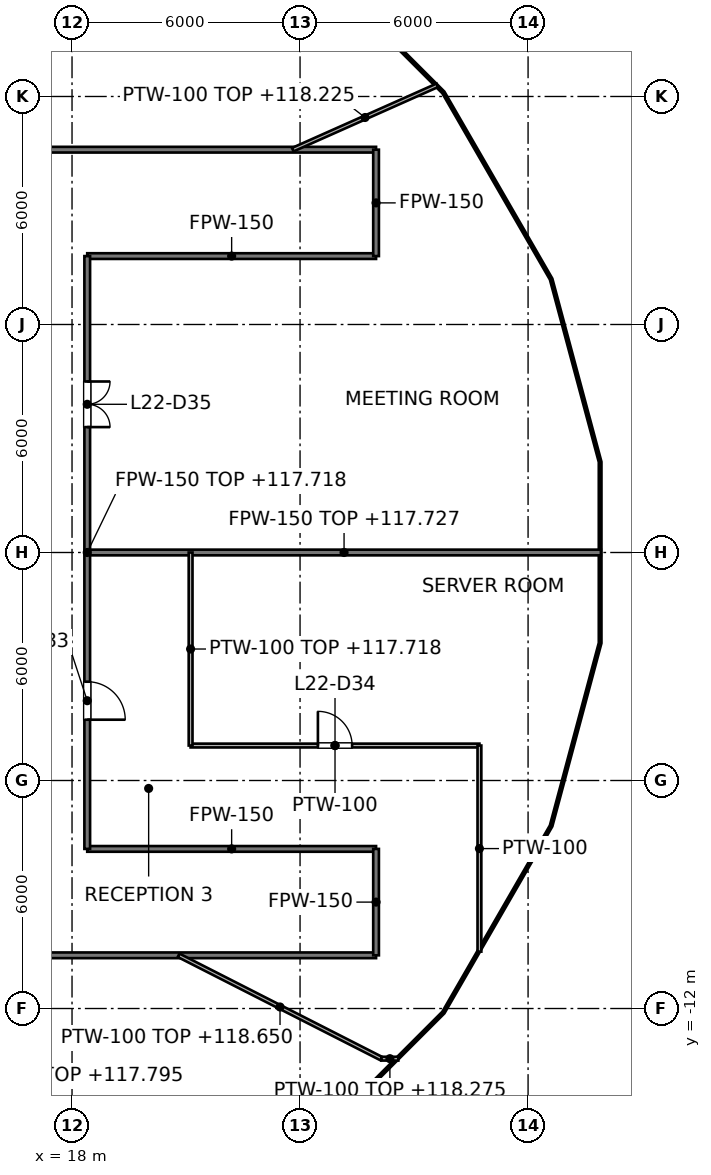
"""IFC4 building model, lengths in metres.
Left out: names, types, materials, properties, quantities, classifications, styles, units other than length and angle.
Written with IfcOpenShell. Run it as: python <this file> out.ifc"""

import sys

from ifc_helpers import new_model, si_unit, direction, frame, frame_2d, origin, place, context, subcontext, project, spatial, rectangle, extrude, element, fill, save


model = new_model("IFC4")
c1 = context("Model", 3, precision=1e-05, world=origin(), true_north=direction((0.0, 1.0)))
c2 = subcontext(c1, "Body", "Model", "MODEL_VIEW")
j1 = project(units=[si_unit("LENGTHUNIT", "METRE"), si_unit("PLANEANGLEUNIT", "RADIAN")], contexts=[c1])
p1 = place(None, origin())
s1 = spatial("IfcSite", under=j1, at=p1, CompositionType="ELEMENT")
p2 = place(p1, origin())
s2 = spatial("IfcBuilding", under=s1, at=p2, CompositionType="ELEMENT")
p3 = place(p2, frame((0.0, 0.0, 114.6)))
s3 = spatial("IfcBuildingStorey", under=s2, at=p3, CompositionType="ELEMENT", Elevation=114.6)
p4 = place(p3, frame((10.6, -10.6, 0.0), z_axis=(0.0, 0.0, 1.0), x_axis=(0.707106781187, -0.707106781187, 0.0)))
e1 = element("IfcWall", 1, at=p4, inside=s3, PredefinedType="PARTITIONING", context=c2, shape_type="SweptSolid", body=[
    extrude(rectangle(XDim=12.105, YDim=0.15, at=frame_2d((6.053, 0.0))), origin(), (0.0, 0.0, 1.0), 3.195),
])
p5 = place(p3, frame((-26.0, -10.6, 0.0), z_axis=(0.0, 0.0, 1.0), x_axis=(1.0, 0.0, 0.0)))
e2 = element("IfcWall", 2, at=p5, inside=s3, PredefinedType="PARTITIONING", context=c2, shape_type="SweptSolid", body=[
    extrude(rectangle(XDim=52.0, YDim=0.15, at=frame_2d((26.0, 0.0))), origin(), (0.0, 0.0, 1.0), 3.127),
])
p6 = place(p5, frame((9.034, 0.0, 0.0)))
e3 = element("IfcOpeningElement", 3, at=p6, cuts=e2, PredefinedType="OPENING", context=c2, shape_type="SweptSolid", body=[
    extrude(rectangle(XDim=1.2, YDim=2.1, at=frame_2d((0.6, 1.05))), frame((0.0, 0.075, 0.0), z_axis=(0.0, -1.0, 0.0), x_axis=(1.0, 0.0, 0.0)), (0.0, 0.0, 1.0), 0.15),
])
p7 = place(p5, frame((19.767, 0.0, 0.0)))
e4 = element("IfcOpeningElement", 4, at=p7, cuts=e2, PredefinedType="OPENING", context=c2, shape_type="SweptSolid", body=[
    extrude(rectangle(XDim=1.0, YDim=2.1, at=frame_2d((0.5, 1.05))), frame((0.0, 0.075, 0.0), z_axis=(0.0, -1.0, 0.0), x_axis=(1.0, 0.0, 0.0)), (0.0, 0.0, 1.0), 0.15),
])
p8 = place(p5, frame((21.763, 0.0, 0.0)))
e5 = element("IfcOpeningElement", 5, at=p8, cuts=e2, PredefinedType="OPENING", context=c2, shape_type="SweptSolid", body=[
    extrude(rectangle(XDim=1.0, YDim=2.1, at=frame_2d((0.5, 1.05))), frame((0.0, 0.075, 0.0), z_axis=(0.0, -1.0, 0.0), x_axis=(1.0, 0.0, 0.0)), (0.0, 0.0, 1.0), 0.15),
])
p9 = place(p5, frame((29.38, 0.0, 0.0)))
e6 = element("IfcOpeningElement", 6, at=p9, cuts=e2, PredefinedType="OPENING", context=c2, shape_type="SweptSolid", body=[
    extrude(rectangle(XDim=1.0, YDim=2.1, at=frame_2d((0.5, 1.05))), frame((0.0, 0.075, 0.0), z_axis=(0.0, -1.0, 0.0), x_axis=(1.0, 0.0, 0.0)), (0.0, 0.0, 1.0), 0.15),
])
p10 = place(p5, frame((41.202, 0.0, 0.0)))
e7 = element("IfcOpeningElement", 7, at=p10, cuts=e2, PredefinedType="OPENING", context=c2, shape_type="SweptSolid", body=[
    extrude(rectangle(XDim=1.0, YDim=2.1, at=frame_2d((0.5, 1.05))), frame((0.0, 0.075, 0.0), z_axis=(0.0, -1.0, 0.0), x_axis=(1.0, 0.0, 0.0)), (0.0, 0.0, 1.0), 0.15),
])
p11 = place(p3, frame((18.4, -7.8, 0.0), z_axis=(0.0, 0.0, 1.0), x_axis=(1.0, 0.0, 0.0)))
e8 = element("IfcWall", 8, at=p11, inside=s3, PredefinedType="PARTITIONING", context=c2, shape_type="SweptSolid", body=[
    extrude(rectangle(XDim=7.6, YDim=0.15, at=frame_2d((3.8, 0.0))), origin(), (0.0, 0.0, 1.0), 3.276),
])
p12 = place(p3, frame((18.4, 0.0, 0.0), z_axis=(0.0, 0.0, 1.0), x_axis=(1.0, 0.0, 0.0)))
e9 = element("IfcWall", 9, at=p12, inside=s3, PredefinedType="PARTITIONING", context=c2, shape_type="SweptSolid", body=[
    extrude(rectangle(XDim=13.516, YDim=0.15, at=frame_2d((6.758, 0.0))), origin(), (0.0, 0.0, 1.0), 3.127),
])
p13 = place(p3, frame((18.4, 7.8, 0.0), z_axis=(0.0, 0.0, 1.0), x_axis=(1.0, 0.0, 0.0)))
e10 = element("IfcWall", 10, at=p13, inside=s3, PredefinedType="PARTITIONING", context=c2, shape_type="SweptSolid", body=[
    extrude(rectangle(XDim=7.6, YDim=0.15, at=frame_2d((3.8, 0.0))), origin(), (0.0, 0.0, 1.0), 3.276),
])
p14 = place(p3, frame((-26.0, 10.6, 0.0), z_axis=(0.0, 0.0, 1.0), x_axis=(1.0, 0.0, 0.0)))
e11 = element("IfcWall", 11, at=p14, inside=s3, PredefinedType="PARTITIONING", context=c2, shape_type="SweptSolid", body=[
    extrude(rectangle(XDim=52.0, YDim=0.15, at=frame_2d((26.0, 0.0))), origin(), (0.0, 0.0, 1.0), 3.077),
])
p15 = place(p14, frame((18.729, 0.0, 0.0)))
e12 = element("IfcOpeningElement", 12, at=p15, cuts=e11, PredefinedType="OPENING", context=c2, shape_type="SweptSolid", body=[
    extrude(rectangle(XDim=1.0, YDim=2.1, at=frame_2d((0.5, 1.05))), frame((0.0, 0.075, 0.0), z_axis=(0.0, -1.0, 0.0), x_axis=(1.0, 0.0, 0.0)), (0.0, 0.0, 1.0), 0.15),
])
p16 = place(p14, frame((7.05, 0.0, 0.0)))
e13 = element("IfcOpeningElement", 13, at=p16, cuts=e11, PredefinedType="OPENING", context=c2, shape_type="SweptSolid", body=[
    extrude(rectangle(XDim=1.2, YDim=2.1, at=frame_2d((0.6, 1.05))), frame((0.0, 0.075, 0.0), z_axis=(0.0, -1.0, 0.0), x_axis=(1.0, 0.0, 0.0)), (0.0, 0.0, 1.0), 0.15),
])
p17 = place(p14, frame((40.464, 0.0, 0.0)))
e14 = element("IfcOpeningElement", 14, at=p17, cuts=e11, PredefinedType="OPENING", context=c2, shape_type="SweptSolid", body=[
    extrude(rectangle(XDim=1.0, YDim=2.1, at=frame_2d((0.5, 1.05))), frame((0.0, 0.075, 0.0), z_axis=(0.0, -1.0, 0.0), x_axis=(1.0, 0.0, 0.0)), (0.0, 0.0, 1.0), 0.15),
])
p18 = place(p14, frame((27.09, 0.0, 0.0)))
e15 = element("IfcOpeningElement", 15, at=p18, cuts=e11, PredefinedType="OPENING", context=c2, shape_type="SweptSolid", body=[
    extrude(rectangle(XDim=1.0, YDim=2.1, at=frame_2d((0.5, 1.05))), frame((0.0, 0.075, 0.0), z_axis=(0.0, -1.0, 0.0), x_axis=(1.0, 0.0, 0.0)), (0.0, 0.0, 1.0), 0.15),
])
for number, where, z_axis, x_axis in (
    (16, (26.0, -10.6, 0.0), (0.0, 0.0, 1.0), (0.0, 1.0, 0.0)),
    (17, (26.0, 7.8, 0.0), (0.0, 0.0, 1.0), (0.0, 1.0, 0.0)),
):
    element("IfcWall", number, at=place(p3, frame(where, z_axis=z_axis, x_axis=x_axis)), inside=s3, PredefinedType="PARTITIONING", context=c2, shape_type="SweptSolid", body=[
        extrude(rectangle(XDim=2.8, YDim=0.15, at=frame_2d((1.4, 0.0))), origin(), (0.0, 0.0, 1.0), 3.276),
    ])
p19 = place(p3, frame((18.4, -7.8, 0.0), z_axis=(0.0, 0.0, 1.0), x_axis=(0.0, 1.0, 0.0)))
e18 = element("IfcWall", 18, at=p19, inside=s3, PredefinedType="PARTITIONING", context=c2, shape_type="SweptSolid", body=[
    extrude(rectangle(XDim=15.6, YDim=0.15, at=frame_2d((7.8, 0.0))), origin(), (0.0, 0.0, 1.0), 3.118),
])
p20 = place(p19, frame((3.4, 0.0, 0.0)))
e19 = element("IfcOpeningElement", 19, at=p20, cuts=e18, PredefinedType="OPENING", context=c2, shape_type="SweptSolid", body=[
    extrude(rectangle(XDim=1.0, YDim=2.1, at=frame_2d((0.5, 1.05))), frame((0.0, 0.075, 0.0), z_axis=(0.0, -1.0, 0.0), x_axis=(1.0, 0.0, 0.0)), (0.0, 0.0, 1.0), 0.15),
])
p21 = place(p19, frame((11.1, 0.0, 0.0)))
e20 = element("IfcOpeningElement", 20, at=p21, cuts=e18, PredefinedType="OPENING", context=c2, shape_type="SweptSolid", body=[
    extrude(rectangle(XDim=1.2, YDim=2.1, at=frame_2d((0.6, 1.05))), frame((0.0, 0.075, 0.0), z_axis=(0.0, -1.0, 0.0), x_axis=(1.0, 0.0, 0.0)), (0.0, 0.0, 1.0), 0.15),
])
p22 = place(p3, frame((20.804, -10.6, 0.0), z_axis=(0.0, 0.0, 1.0), x_axis=(0.891002798049, -0.453997812626, 0.0)))
e21 = element("IfcWall", 21, at=p22, inside=s3, PredefinedType="PARTITIONING", context=c2, shape_type="SweptSolid", body=[
    extrude(rectangle(XDim=5.991, YDim=0.1, at=frame_2d((2.996, 0.0))), origin(), (0.0, 0.0, 1.0), 4.05),
])
p23 = place(p3, frame((26.142, -13.32, 0.0), z_axis=(0.0, 0.0, 1.0), x_axis=(1.0, 0.0, 0.0)))
e22 = element("IfcWall", 22, at=p23, inside=s3, PredefinedType="PARTITIONING", context=c2, shape_type="SweptSolid", body=[
    extrude(rectangle(XDim=0.444, YDim=0.1, at=frame_2d((0.222, 0.0))), origin(), (0.0, 0.0, 1.0), 3.675),
])
p24 = place(p3, frame((21.12, -5.08, 0.0), z_axis=(0.0, 0.0, 1.0), x_axis=(1.0, 0.0, 0.0)))
e23 = element("IfcWall", 23, at=p24, inside=s3, PredefinedType="PARTITIONING", context=c2, shape_type="SweptSolid", body=[
    extrude(rectangle(XDim=7.6, YDim=0.1, at=frame_2d((3.8, 0.0))), origin(), (0.0, 0.0, 1.0), 3.127),
])
p25 = place(p24, frame((3.35, 0.0, 0.0)))
e24 = element("IfcOpeningElement", 24, at=p25, cuts=e23, PredefinedType="OPENING", context=c2, shape_type="SweptSolid", body=[
    extrude(rectangle(XDim=0.9, YDim=2.1, at=frame_2d((0.45, 1.05))), frame((0.0, 0.05, 0.0), z_axis=(0.0, -1.0, 0.0), x_axis=(1.0, 0.0, 0.0)), (0.0, 0.0, 1.0), 0.1),
])
p26 = place(p3, frame((23.808, 10.6, 0.0), z_axis=(0.0, 0.0, 1.0), x_axis=(0.913526027042, 0.406780282114, 0.0)))
e25 = element("IfcWall", 25, at=p26, inside=s3, PredefinedType="PARTITIONING", context=c2, shape_type="SweptSolid", body=[
    extrude(rectangle(XDim=4.164, YDim=0.1, at=frame_2d((2.082, 0.0))), origin(), (0.0, 0.0, 1.0), 3.625),
])
p27 = place(p3, frame((28.72, -10.503, 0.0), z_axis=(0.0, 0.0, 1.0), x_axis=(0.0, 1.0, 0.0)))
e26 = element("IfcWall", 26, at=p27, inside=s3, PredefinedType="PARTITIONING", context=c2, shape_type="SweptSolid", body=[
    extrude(rectangle(XDim=5.423, YDim=0.1, at=frame_2d((2.711, 0.0))), origin(), (0.0, 0.0, 1.0), 3.127),
])
p28 = place(p3, frame((21.12, -5.08, 0.0), z_axis=(0.0, 0.0, 1.0), x_axis=(0.0, 1.0, 0.0)))
e27 = element("IfcWall", 27, at=p28, inside=s3, PredefinedType="PARTITIONING", context=c2, shape_type="SweptSolid", body=[
    extrude(rectangle(XDim=5.08, YDim=0.1, at=frame_2d((2.54, 0.0))), origin(), (0.0, 0.0, 1.0), 3.118),
])
p29 = place(p20, origin())
e28 = element("IfcDoor", 28, at=p29, inside=s3, OperationType="SINGLE_SWING_LEFT", PredefinedType="DOOR", context=c2, shape_type="SweptSolid", body=[
    extrude(rectangle(XDim=1.0, YDim=2.1, at=frame_2d((0.5, 1.05))), frame((0.0, 0.025, 0.0), z_axis=(0.0, -1.0, 0.0), x_axis=(1.0, 0.0, 0.0)), (0.0, 0.0, 1.0), 0.05),
])
fill(e19, e28)
p30 = place(p25, origin())
e29 = element("IfcDoor", 29, at=p30, inside=s3, OperationType="SINGLE_SWING_LEFT", PredefinedType="DOOR", context=c2, shape_type="SweptSolid", body=[
    extrude(rectangle(XDim=0.9, YDim=2.1, at=frame_2d((0.45, 1.05))), frame((0.0, 0.025, 0.0), z_axis=(0.0, -1.0, 0.0), x_axis=(1.0, 0.0, 0.0)), (0.0, 0.0, 1.0), 0.05),
])
fill(e24, e29)
p31 = place(p21, origin())
e30 = element("IfcDoor", 30, at=p31, inside=s3, OperationType="DOUBLE_DOOR_SINGLE_SWING", PredefinedType="DOOR", context=c2, shape_type="SweptSolid", body=[
    extrude(rectangle(XDim=1.2, YDim=2.1, at=frame_2d((0.6, 1.05))), frame((0.0, 0.025, 0.0), z_axis=(0.0, -1.0, 0.0), x_axis=(1.0, 0.0, 0.0)), (0.0, 0.0, 1.0), 0.05),
])
fill(e20, e30)
save(model, sys.argv[1])
